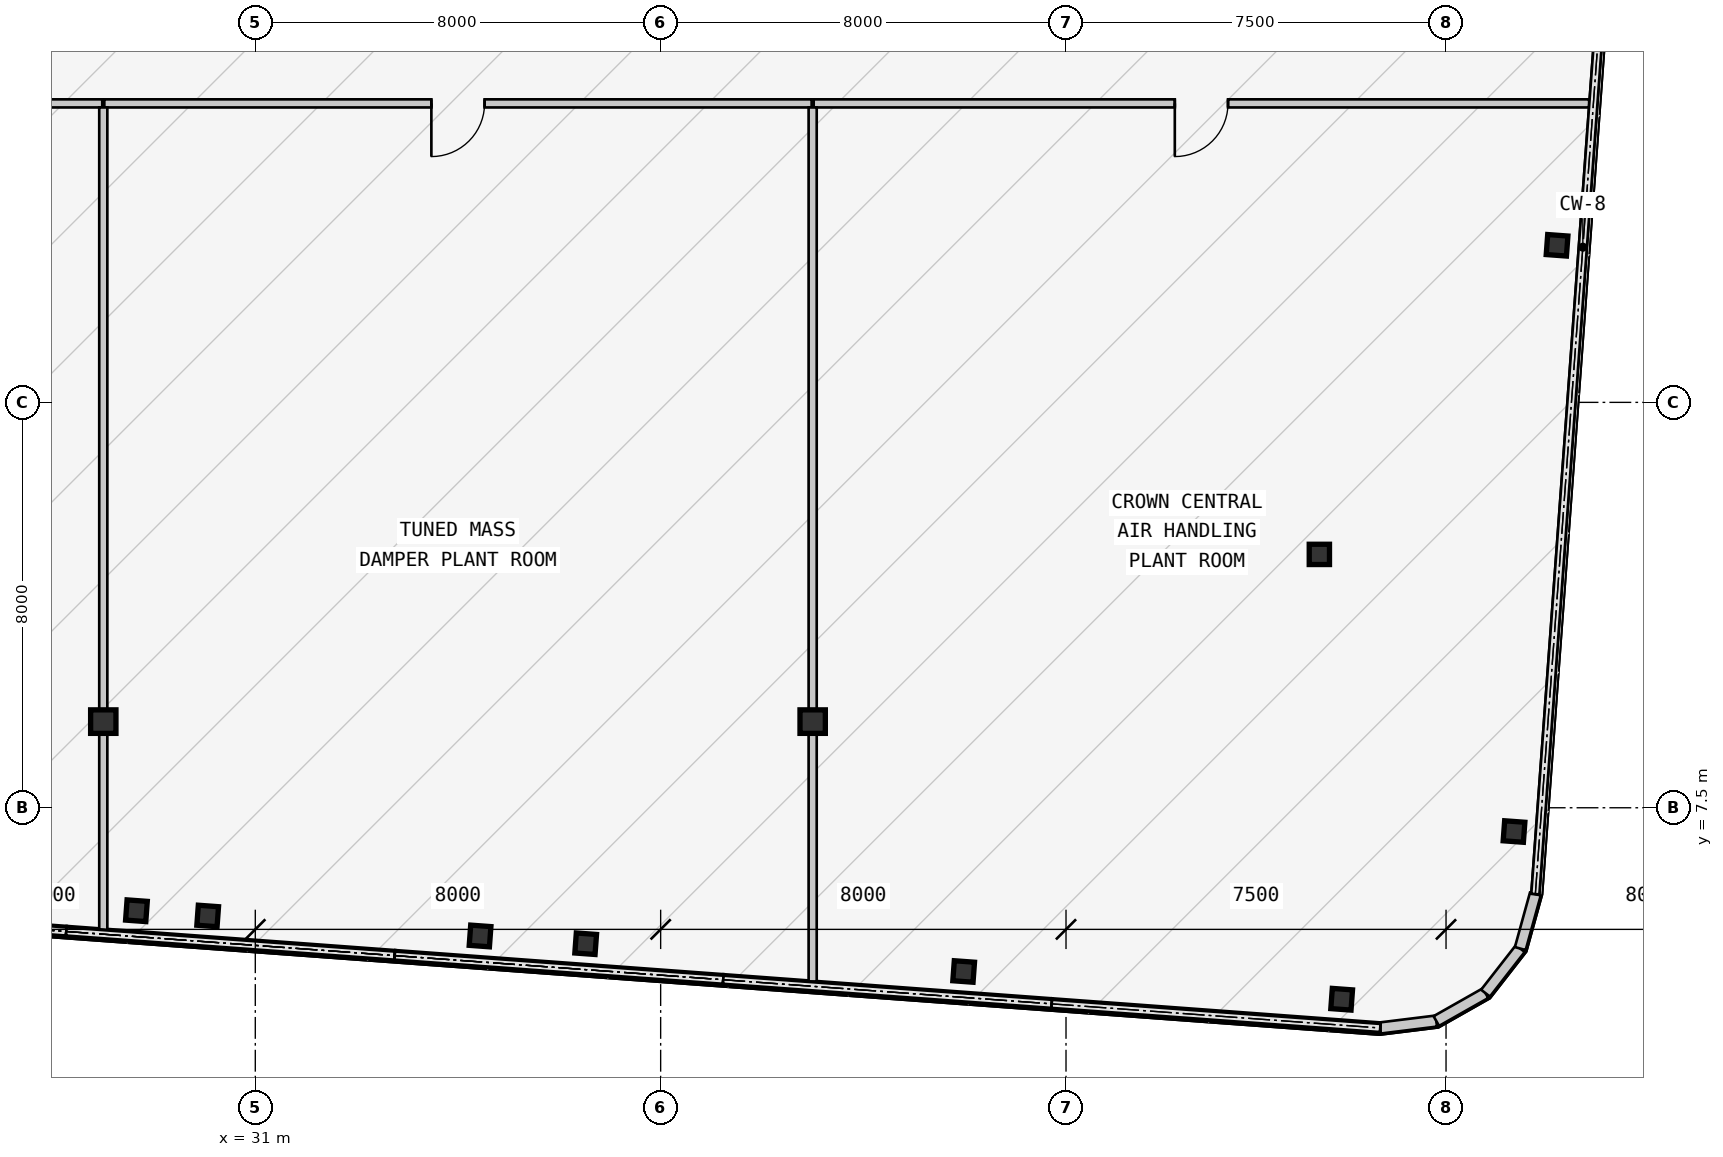
"""IFC4 building model, lengths in metres.
Left out: names, types, materials, properties, quantities, classifications, styles, units other than length and angle.
Written with IfcOpenShell. Run it as: python <this file> out.ifc"""

import sys

from ifc_helpers import new_model, si_unit, direction, frame, frame_2d, origin, origin_2d, place, context, subcontext, project, spatial, polyline, rectangle, hollow_rectangle, i_section, outline, extrude, source, transform, mapped, element, fill, save


model = new_model("IFC4")
c1 = context("Model", 3, precision=1e-05, world=origin(), true_north=direction((0.0, 1.0)))
c2 = subcontext(c1, "Body", "Model", "MODEL_VIEW")
j1 = project(units=[si_unit("LENGTHUNIT", "METRE"), si_unit("PLANEANGLEUNIT", "RADIAN")], contexts=[c1])
p1 = place(None, origin())
s1 = spatial("IfcSite", under=j1, at=p1, CompositionType="ELEMENT")
p2 = place(p1, origin())
s2 = spatial("IfcBuilding", under=s1, at=p2, CompositionType="ELEMENT")
p3 = place(p2, frame((0.0, 0.0, 253.05)))
s3 = spatial("IfcBuildingStorey", under=s2, at=p3, CompositionType="ELEMENT", Elevation=253.05)
m1 = source(origin(), c2, "Body", "SweptSolid", [
    extrude(i_section(OverallWidth=0.5, OverallDepth=0.464, WebThickness=0.022, FlangeThickness=0.034, at=origin_2d()), origin(), (0.0, 0.0, 1.0), 12.492),
])
p4 = place(p3, frame((28.0, 9.2, 0.0), z_axis=(0.0, 0.0, 1.0), x_axis=(1.0, 0.0, 0.0)))
e1 = element("IfcColumn", 1, at=p4, inside=s3, PredefinedType="COLUMN", context=c2, shape_type="MappedRepresentation", body=[
    mapped(m1, transform((0.0, 0.0, 0.0), scale=1.0)),
])
m2 = source(origin(), c2, "Body", "SweptSolid", [
    extrude(i_section(OverallWidth=0.5, OverallDepth=0.464, WebThickness=0.022, FlangeThickness=0.034, at=origin_2d()), origin(), (0.0, 0.0, 1.0), 8.489),
])
p5 = place(p3, frame((42.0, 9.2, 0.0), z_axis=(0.0, 0.0, 1.0), x_axis=(1.0, 0.0, 0.0)))
e2 = element("IfcColumn", 2, at=p5, inside=s3, PredefinedType="COLUMN", context=c2, shape_type="MappedRepresentation", body=[
    mapped(m2, transform((0.0, 0.0, 0.0), scale=1.0)),
])
m3 = source(origin(), c2, "Body", "SweptSolid", [
    extrude(hollow_rectangle(XDim=0.4, YDim=0.4, WallThickness=0.016, at=origin_2d()), origin(), (0.0, 0.0, 1.0), 5.699),
])
p6 = place(p3, frame((52.0, 12.5, 0.0), z_axis=(0.0, 0.0, 1.0), x_axis=(1.0, 0.0, 0.0)))
e3 = element("IfcColumn", 3, at=p6, inside=s3, PredefinedType="COLUMN", context=c2, shape_type="MappedRepresentation", body=[
    mapped(m3, transform((0.0, 0.0, 0.0), scale=1.0)),
])
m4 = source(origin(), c2, "Body", "SweptSolid", [
    extrude(i_section(OverallWidth=0.4, OverallDepth=0.396, WebThickness=0.022, FlangeThickness=0.034, at=origin_2d()), origin(), (0.0, 0.0, 1.0), 11.822),
])
p7 = place(p3, frame((30.061, 5.365, 0.0), z_axis=(0.0, 0.0, 1.0), x_axis=(0.997314477224, -0.073238197128, 0.0)))
e4 = element("IfcColumn", 4, at=p7, inside=s3, PredefinedType="COLUMN", context=c2, shape_type="MappedRepresentation", body=[
    mapped(m4, transform((0.0, 0.0, 0.0), scale=1.0)),
])
m5 = source(origin(), c2, "Body", "SweptSolid", [
    extrude(i_section(OverallWidth=0.4, OverallDepth=0.396, WebThickness=0.022, FlangeThickness=0.034, at=origin_2d()), origin(), (0.0, 0.0, 1.0), 9.678),
])
p8 = place(p3, frame((37.521, 4.817, 0.0), z_axis=(0.0, 0.0, 1.0), x_axis=(0.997314477224, -0.073238197128, 0.0)))
e5 = element("IfcColumn", 5, at=p8, inside=s3, PredefinedType="COLUMN", context=c2, shape_type="MappedRepresentation", body=[
    mapped(m5, transform((0.0, 0.0, 0.0), scale=1.0)),
])
m6 = source(origin(), c2, "Body", "SweptSolid", [
    extrude(i_section(OverallWidth=0.4, OverallDepth=0.396, WebThickness=0.022, FlangeThickness=0.034, at=origin_2d()), origin(), (0.0, 0.0, 1.0), 7.533),
])
p9 = place(p3, frame((44.98, 4.269, 0.0), z_axis=(0.0, 0.0, 1.0), x_axis=(0.997314477224, -0.073238197128, 0.0)))
e6 = element("IfcColumn", 6, at=p9, inside=s3, PredefinedType="COLUMN", context=c2, shape_type="MappedRepresentation", body=[
    mapped(m6, transform((0.0, 0.0, 0.0), scale=1.0)),
])
m7 = source(origin(), c2, "Body", "SweptSolid", [
    extrude(hollow_rectangle(XDim=0.4, YDim=0.4, WallThickness=0.016, at=origin_2d()), origin(), (0.0, 0.0, 1.0), 5.389),
])
p10 = place(p3, frame((52.44, 3.721, 0.0), z_axis=(0.0, 0.0, 1.0), x_axis=(0.997314477224, -0.073238197128, 0.0)))
e7 = element("IfcColumn", 7, at=p10, inside=s3, PredefinedType="COLUMN", context=c2, shape_type="MappedRepresentation", body=[
    mapped(m7, transform((0.0, 0.0, 0.0), scale=1.0)),
])
m8 = source(origin(), c2, "Body", "SweptSolid", [
    extrude(i_section(OverallWidth=0.4, OverallDepth=0.396, WebThickness=0.022, FlangeThickness=0.034, at=origin_2d()), origin(), (0.0, 0.0, 1.0), 4.486),
])
for number, where, z_axis, x_axis in (
    (8, (55.842, 7.031, 0.0), (0.0, 0.0, 1.0), (0.997, -0.073, 0.0)),
    (9, (56.691, 18.6, 0.0), (0.0, 0.0, 1.0), (0.997, -0.073, 0.0)),
):
    element("IfcColumn", number, at=place(p3, frame(where, z_axis=z_axis, x_axis=x_axis)), inside=s3, PredefinedType="COLUMN", context=c2, shape_type="MappedRepresentation", body=[
        mapped(m8, transform((0.0, 0.0, 0.0), scale=1.0)),
    ])
m9 = source(origin(), c2, "Body", "SweptSolid", [
    extrude(hollow_rectangle(XDim=0.4, YDim=0.4, WallThickness=0.016, at=origin_2d()), origin(), (0.0, 0.0, 1.0), 12.226),
])
p11 = place(p3, frame((28.654, 5.468, 0.0), z_axis=(0.0, 0.0, 1.0), x_axis=(0.997314477224, -0.073238197128, 0.0)))
e10 = element("IfcColumn", 10, at=p11, inside=s3, PredefinedType="COLUMN", context=c2, shape_type="MappedRepresentation", body=[
    mapped(m9, transform((0.0, 0.0, 0.0), scale=1.0)),
])
m10 = source(origin(), c2, "Body", "SweptSolid", [
    extrude(hollow_rectangle(XDim=0.4, YDim=0.4, WallThickness=0.016, at=origin_2d()), origin(), (0.0, 0.0, 1.0), 10.277),
])
p12 = place(p3, frame((35.436, 4.97, 0.0), z_axis=(0.0, 0.0, 1.0), x_axis=(0.997314477224, -0.073238197128, 0.0)))
e11 = element("IfcColumn", 11, at=p12, inside=s3, PredefinedType="COLUMN", context=c2, shape_type="MappedRepresentation", body=[
    mapped(m10, transform((0.0, 0.0, 0.0), scale=1.0)),
])
p13 = place(p3, frame((53.201, 3.154, 0.0), z_axis=(0.0, 0.0, 1.0), x_axis=(0.992438604032, 0.122742076028, 0.0)))
e12 = element("IfcWall", 12, at=p13, inside=s3, PredefinedType="SOLIDWALL", context=c2, shape_type="SweptSolid", body=[
    extrude(outline(polyline([(0.0, 0.0), (1.116, 0.0), (1.116, 4.804), (0.0, 5.118), (0.0, 0.0)])), frame((0.0, 0.11, 0.0), z_axis=(0.0, -1.0, 0.0), x_axis=(1.0, 0.0, 0.0)), (0.0, 0.0, 1.0), 0.22),
])
p14 = place(p3, frame((54.308, 3.291, 0.0), z_axis=(0.0, 0.0, 1.0), x_axis=(0.869893934693, 0.49323882895, 0.0)))
e13 = element("IfcWall", 13, at=p14, inside=s3, PredefinedType="SOLIDWALL", context=c2, shape_type="SweptSolid", body=[
    extrude(outline(polyline([(0.0, 0.0), (1.116, 0.0), (1.116, 4.538), (0.0, 4.804), (0.0, 0.0)])), frame((0.0, 0.11, 0.0), z_axis=(0.0, -1.0, 0.0), x_axis=(1.0, 0.0, 0.0)), (0.0, 0.0, 1.0), 0.22),
])
p15 = place(p3, frame((55.279, 3.841, 0.0), z_axis=(0.0, 0.0, 1.0), x_axis=(0.615015475096, 0.788515038152, 0.0)))
e14 = element("IfcWall", 14, at=p15, inside=s3, PredefinedType="SOLIDWALL", context=c2, shape_type="SweptSolid", body=[
    extrude(outline(polyline([(0.0, 0.0), (1.116, 0.0), (1.116, 4.36), (0.0, 4.538), (0.0, 0.0)])), frame((0.0, 0.11, 0.0), z_axis=(0.0, -1.0, 0.0), x_axis=(1.0, 0.0, 0.0)), (0.0, 0.0, 1.0), 0.22),
])
p16 = place(p3, frame((55.965, 4.721, 0.0), z_axis=(0.0, 0.0, 1.0), x_axis=(0.26624444942, 0.963905541613, 0.0)))
e15 = element("IfcWall", 15, at=p16, inside=s3, PredefinedType="SOLIDWALL", context=c2, shape_type="SweptSolid", body=[
    extrude(outline(polyline([(0.0, 0.0), (1.116, 0.0), (1.116, 4.298), (0.0, 4.36), (0.0, 0.0)])), frame((0.0, 0.11, 0.0), z_axis=(0.0, -1.0, 0.0), x_axis=(1.0, 0.0, 0.0)), (0.0, 0.0, 1.0), 0.22),
])
p17 = place(p3, frame((20.788, 5.534, 12.378), z_axis=(0.0, 0.0, 1.0), x_axis=(0.997314084878, -0.073243539677, 0.0)))
e16 = element("IfcWall", 16, at=p17, inside=s3, PredefinedType="SOLIDWALL", context=c2, shape_type="SweptSolid", body=[
    extrude(outline(polyline([(0.0, 0.0), (6.5, 0.0), (6.5, 0.22), (0.0, 2.083), (0.0, 0.0)])), frame((0.0, 0.11, 0.0), z_axis=(0.0, -1.0, 0.0), x_axis=(1.0, 0.0, 0.0)), (0.0, 0.0, 1.0), 0.22),
])
p18 = place(p3, frame((27.271, 5.058, 10.515), z_axis=(0.0, 0.0, 1.0), x_axis=(0.997314286366, -0.073240796084, 0.0)))
e17 = element("IfcWall", 17, at=p18, inside=s3, PredefinedType="SOLIDWALL", context=c2, shape_type="SweptSolid", body=[
    extrude(outline(polyline([(0.0, 0.0), (6.5, 0.0), (6.5, 0.22), (0.0, 2.083), (0.0, 0.0)])), frame((0.0, 0.11, 0.0), z_axis=(0.0, -1.0, 0.0), x_axis=(1.0, 0.0, 0.0)), (0.0, 0.0, 1.0), 0.22),
])
p19 = place(p3, frame((33.753, 4.582, 8.652), z_axis=(0.0, 0.0, 1.0), x_axis=(0.997314084878, -0.073243539677, 0.0)))
e18 = element("IfcWall", 18, at=p19, inside=s3, PredefinedType="SOLIDWALL", context=c2, shape_type="SweptSolid", body=[
    extrude(outline(polyline([(0.0, 0.0), (6.5, 0.0), (6.5, 0.22), (0.0, 2.083), (0.0, 0.0)])), frame((0.0, 0.11, 0.0), z_axis=(0.0, -1.0, 0.0), x_axis=(1.0, 0.0, 0.0)), (0.0, 0.0, 1.0), 0.22),
])
p20 = place(p3, frame((40.236, 4.106, 6.788), z_axis=(0.0, 0.0, 1.0), x_axis=(0.997314286366, -0.073240796084, 0.0)))
e19 = element("IfcWall", 19, at=p20, inside=s3, PredefinedType="SOLIDWALL", context=c2, shape_type="SweptSolid", body=[
    extrude(outline(polyline([(0.0, 0.0), (6.5, 0.0), (6.5, 0.22), (0.0, 2.083), (0.0, 0.0)])), frame((0.0, 0.11, 0.0), z_axis=(0.0, -1.0, 0.0), x_axis=(1.0, 0.0, 0.0)), (0.0, 0.0, 1.0), 0.22),
])
p21 = place(p3, frame((46.718, 3.63, 4.925), z_axis=(0.0, 0.0, 1.0), x_axis=(0.997314084878, -0.073243539677, 0.0)))
e20 = element("IfcWall", 20, at=p21, inside=s3, PredefinedType="SOLIDWALL", context=c2, shape_type="SweptSolid", body=[
    extrude(outline(polyline([(0.0, 0.0), (6.5, 0.0), (6.5, 0.22), (0.0, 2.083), (0.0, 0.0)])), frame((0.0, 0.11, 0.0), z_axis=(0.0, -1.0, 0.0), x_axis=(1.0, 0.0, 0.0)), (0.0, 0.0, 1.0), 0.22),
])
m11 = source(origin(), c2, "Body", "SweptSolid", [
    extrude(rectangle(XDim=13.959, YDim=0.16, at=frame_2d((6.98, 0.0))), origin(), (0.0, 0.0, 1.0), 4.3),
])
p22 = place(p3, frame((41.98, 21.4, 0.0), z_axis=(0.0, 0.0, 1.0), x_axis=(-1.0, 0.0, 0.0)))
e21 = element("IfcWall", 21, at=p22, inside=s3, PredefinedType="PARTITIONING", context=c2, shape_type="MappedRepresentation", body=[
    mapped(m11, transform((0.0, 0.0, 0.0), scale=1.0)),
])
m12 = source(origin(), c2, "Body", "SweptSolid", [
    extrude(rectangle(XDim=1.05, YDim=2.1, at=frame_2d((0.525, 1.05))), frame((0.0, 0.09, 0.0), z_axis=(0.0, -1.0, 0.0), x_axis=(1.0, 0.0, 0.0)), (0.0, 0.0, 1.0), 0.18),
])
p23 = place(p22, frame((6.455, 0.0, 0.0)))
e22 = element("IfcOpeningElement", 22, at=p23, cuts=e21, PredefinedType="OPENING", context=c2, shape_type="MappedRepresentation", body=[
    mapped(m12, transform((0.0, 0.0, 0.0), scale=1.0)),
])
m13 = source(origin(), c2, "Body", "SweptSolid", [
    extrude(rectangle(XDim=15.316, YDim=0.16, at=frame_2d((7.658, 0.0))), origin(), (0.0, 0.0, 1.0), 4.3),
])
p24 = place(p3, frame((27.98, 21.4, 0.0), z_axis=(0.0, 0.0, 1.0), x_axis=(-1.0, 0.0, 0.0)))
e23 = element("IfcWall", 23, at=p24, inside=s3, PredefinedType="PARTITIONING", context=c2, shape_type="MappedRepresentation", body=[
    mapped(m13, transform((0.0, 0.0, 0.0), scale=1.0)),
])
p25 = place(p24, frame((7.133, 0.0, 0.0)))
e24 = element("IfcOpeningElement", 24, at=p25, cuts=e23, PredefinedType="OPENING", context=c2, shape_type="MappedRepresentation", body=[
    mapped(m12, transform((0.0, 0.0, 0.0), scale=1.0)),
])
m14 = source(origin(), c2, "Body", "SweptSolid", [
    extrude(rectangle(XDim=15.304, YDim=0.16, at=frame_2d((7.652, 0.0))), origin(), (0.0, 0.0, 1.0), 4.3),
])
p26 = place(p3, frame((57.324, 21.4, 0.0), z_axis=(0.0, 0.0, 1.0), x_axis=(-1.0, 0.0, 0.0)))
e25 = element("IfcWall", 25, at=p26, inside=s3, PredefinedType="PARTITIONING", context=c2, shape_type="MappedRepresentation", body=[
    mapped(m14, transform((0.0, 0.0, 0.0), scale=1.0)),
])
p27 = place(p26, frame((7.127, 0.0, 0.0)))
e26 = element("IfcOpeningElement", 26, at=p27, cuts=e25, PredefinedType="OPENING", context=c2, shape_type="MappedRepresentation", body=[
    mapped(m12, transform((0.0, 0.0, 0.0), scale=1.0)),
])
m15 = source(origin(), c2, "Body", "SweptSolid", [
    extrude(rectangle(XDim=16.231, YDim=0.16, at=frame_2d((8.116, 0.0))), origin(), (0.0, 0.0, 1.0), 4.3),
])
p28 = place(p3, frame((28.0, 5.089, 0.0), z_axis=(0.0, 0.0, 1.0), x_axis=(0.0, 1.0, 0.0)))
e27 = element("IfcWall", 27, at=p28, inside=s3, PredefinedType="PARTITIONING", context=c2, shape_type="MappedRepresentation", body=[
    mapped(m15, transform((0.0, 0.0, 0.0), scale=1.0)),
])
m16 = source(origin(), c2, "Body", "SweptSolid", [
    extrude(rectangle(XDim=17.248, YDim=0.16, at=frame_2d((8.624, 0.0))), origin(), (0.0, 0.0, 1.0), 4.3),
])
p29 = place(p3, frame((42.0, 21.32, 0.0), z_axis=(0.0, 0.0, 1.0), x_axis=(0.0, -1.0, 0.0)))
e28 = element("IfcWall", 28, at=p29, inside=s3, PredefinedType="PARTITIONING", context=c2, shape_type="MappedRepresentation", body=[
    mapped(m16, transform((0.0, 0.0, 0.0), scale=1.0)),
])
m17 = source(origin(), c2, "Body", "SweptSolid", [
    extrude(rectangle(XDim=1.05, YDim=2.1, at=frame_2d((0.525, 1.05))), frame((0.0, 0.025, 0.0), z_axis=(0.0, -1.0, 0.0), x_axis=(1.0, 0.0, 0.0)), (0.0, 0.0, 1.0), 0.05),
])
p30 = place(p23, origin())
e29 = element("IfcDoor", 29, at=p30, inside=s3, OperationType="SINGLE_SWING_RIGHT", PredefinedType="DOOR", context=c2, shape_type="MappedRepresentation", body=[
    mapped(m17, transform((0.0, 0.0, 0.0), scale=1.0)),
])
fill(e22, e29)
p31 = place(p27, origin())
e30 = element("IfcDoor", 30, at=p31, inside=s3, OperationType="SINGLE_SWING_RIGHT", PredefinedType="DOOR", context=c2, shape_type="MappedRepresentation", body=[
    mapped(m17, transform((0.0, 0.0, 0.0), scale=1.0)),
])
fill(e26, e30)
save(model, sys.argv[1])
